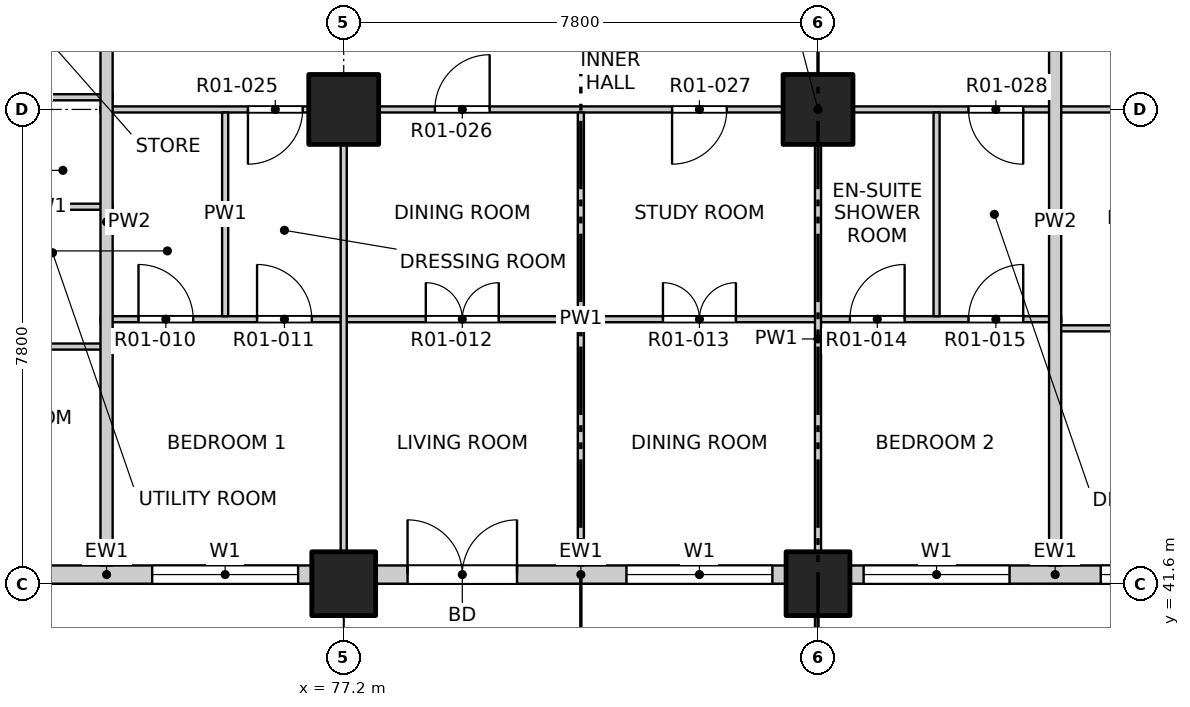
"""IFC4 building model, lengths in metres.
Left out: names, types, materials, properties, quantities, classifications, styles, units other than length and angle.
Written with IfcOpenShell. Run it as: python <this file> out.ifc"""

import sys

from ifc_helpers import new_model, si_unit, direction, frame, frame_2d, origin, origin_2d, place, context, subcontext, project, spatial, rectangle, extrude, element, fill, save


model = new_model("IFC4")
c1 = context("Model", 3, precision=1e-05, world=origin(), true_north=direction((0.0, 1.0)))
c2 = subcontext(c1, "Body", "Model", "MODEL_VIEW")
j1 = project(units=[si_unit("LENGTHUNIT", "METRE"), si_unit("PLANEANGLEUNIT", "RADIAN")], contexts=[c1])
p1 = place(None, origin())
s1 = spatial("IfcSite", under=j1, at=p1, CompositionType="ELEMENT")
p2 = place(p1, origin())
s2 = spatial("IfcBuilding", under=s1, at=p2, CompositionType="ELEMENT")
p3 = place(p2, frame((0.0, 0.0, 26.3)))
s3 = spatial("IfcBuildingStorey", under=s2, at=p3, CompositionType="ELEMENT", Elevation=26.3)
for number, where, z_axis, x_axis in (
    (1, (77.2, 41.6, -0.25), (0.0, 0.0, 1.0), (1.0, 0.0, 0.0)),
    (2, (85.0, 41.6, -0.25), (0.0, 0.0, 1.0), (1.0, 0.0, 0.0)),
):
    element("IfcColumn", number, at=place(p3, frame(where, z_axis=z_axis, x_axis=x_axis)), inside=s3, PredefinedType="COLUMN", context=c2, shape_type="SweptSolid", body=[
        extrude(rectangle(XDim=1.05, YDim=1.05, at=origin_2d()), origin(), (0.0, 0.0, 1.0), 3.4),
    ])
for number, where, z_axis, x_axis in (
    (3, (77.2, 49.4, -0.25), (0.0, 0.0, 1.0), (1.0, 0.0, 0.0)),
    (4, (85.0, 49.4, -0.25), (0.0, 0.0, 1.0), (1.0, 0.0, 0.0)),
):
    element("IfcColumn", number, at=place(p3, frame(where, z_axis=z_axis, x_axis=x_axis)), inside=s3, PredefinedType="COLUMN", context=c2, shape_type="SweptSolid", body=[
        extrude(rectangle(XDim=1.15, YDim=1.15, at=origin_2d()), origin(), (0.0, 0.0, 1.0), 3.4),
    ])
p4 = place(p3, frame((69.925, 41.75, 0.0), z_axis=(0.0, 0.0, 1.0), x_axis=(1.0, 0.0, 0.0)))
e5 = element("IfcWall", 5, at=p4, inside=s3, PredefinedType="SOLIDWALL", context=c2, shape_type="SweptSolid", body=[
    extrude(rectangle(XDim=6.75, YDim=0.3, at=frame_2d((3.375, 0.0))), origin(), (0.0, 0.0, 1.0), 2.7),
])
p5 = place(p4, frame((0.525, 0.0, 0.0)))
e6 = element("IfcOpeningElement", 6, at=p5, cuts=e5, PredefinedType="OPENING", context=c2, shape_type="SweptSolid", body=[
    extrude(rectangle(XDim=1.8, YDim=2.4, at=frame_2d((0.9, 1.2))), frame((0.0, 0.16, 0.0), z_axis=(0.0, -1.0, 0.0), x_axis=(1.0, 0.0, 0.0)), (0.0, 0.0, 1.0), 0.32),
])
p6 = place(p4, frame((4.125, 0.0, 0.9)))
e7 = element("IfcOpeningElement", 7, at=p6, cuts=e5, PredefinedType="OPENING", context=c2, shape_type="SweptSolid", body=[
    extrude(rectangle(XDim=2.4, YDim=1.8, at=frame_2d((1.2, 0.9))), frame((0.0, 0.16, 0.0), z_axis=(0.0, -1.0, 0.0), x_axis=(1.0, 0.0, 0.0)), (0.0, 0.0, 1.0), 0.32),
])
p7 = place(p3, frame((77.725, 41.75, 0.0), z_axis=(0.0, 0.0, 1.0), x_axis=(1.0, 0.0, 0.0)))
e8 = element("IfcWall", 8, at=p7, inside=s3, PredefinedType="SOLIDWALL", context=c2, shape_type="SweptSolid", body=[
    extrude(rectangle(XDim=6.75, YDim=0.3, at=frame_2d((3.375, 0.0))), origin(), (0.0, 0.0, 1.0), 2.7),
])
p8 = place(p7, frame((0.525, 0.0, 0.0)))
e9 = element("IfcOpeningElement", 9, at=p8, cuts=e8, PredefinedType="OPENING", context=c2, shape_type="SweptSolid", body=[
    extrude(rectangle(XDim=1.8, YDim=2.4, at=frame_2d((0.9, 1.2))), frame((0.0, 0.16, 0.0), z_axis=(0.0, -1.0, 0.0), x_axis=(1.0, 0.0, 0.0)), (0.0, 0.0, 1.0), 0.32),
])
p9 = place(p7, frame((4.125, 0.0, 0.9)))
e10 = element("IfcOpeningElement", 10, at=p9, cuts=e8, PredefinedType="OPENING", context=c2, shape_type="SweptSolid", body=[
    extrude(rectangle(XDim=2.4, YDim=1.8, at=frame_2d((1.2, 0.9))), frame((0.0, 0.16, 0.0), z_axis=(0.0, -1.0, 0.0), x_axis=(1.0, 0.0, 0.0)), (0.0, 0.0, 1.0), 0.32),
])
p10 = place(p3, frame((85.525, 41.75, 0.0), z_axis=(0.0, 0.0, 1.0), x_axis=(1.0, 0.0, 0.0)))
e11 = element("IfcWall", 11, at=p10, inside=s3, PredefinedType="SOLIDWALL", context=c2, shape_type="SweptSolid", body=[
    extrude(rectangle(XDim=6.75, YDim=0.3, at=frame_2d((3.375, 0.0))), origin(), (0.0, 0.0, 1.0), 2.7),
])
p11 = place(p10, frame((0.225, 0.0, 0.9)))
e12 = element("IfcOpeningElement", 12, at=p11, cuts=e11, PredefinedType="OPENING", context=c2, shape_type="SweptSolid", body=[
    extrude(rectangle(XDim=2.4, YDim=1.8, at=frame_2d((1.2, 0.9))), frame((0.0, 0.16, 0.0), z_axis=(0.0, -1.0, 0.0), x_axis=(1.0, 0.0, 0.0)), (0.0, 0.0, 1.0), 0.32),
])
p12 = place(p10, frame((4.125, 0.0, 0.9)))
e13 = element("IfcOpeningElement", 13, at=p12, cuts=e11, PredefinedType="OPENING", context=c2, shape_type="SweptSolid", body=[
    extrude(rectangle(XDim=2.4, YDim=1.8, at=frame_2d((1.2, 0.9))), frame((0.0, 0.16, 0.0), z_axis=(0.0, -1.0, 0.0), x_axis=(1.0, 0.0, 0.0)), (0.0, 0.0, 1.0), 0.32),
])
p13 = place(p3, frame((61.9, 45.5, 0.0), z_axis=(0.0, 0.0, 1.0), x_axis=(1.0, 0.0, 0.0)))
e14 = element("IfcWall", 14, at=p13, inside=s3, PredefinedType="PARTITIONING", context=c2, shape_type="SweptSolid", body=[
    extrude(rectangle(XDim=11.5, YDim=0.1, at=frame_2d((5.75, 0.0))), origin(), (0.0, 0.0, 1.0), 3.15),
])
p14 = place(p13, frame((7.965, 0.0, 0.0)))
e15 = element("IfcOpeningElement", 15, at=p14, cuts=e14, PredefinedType="OPENING", context=c2, shape_type="SweptSolid", body=[
    extrude(rectangle(XDim=0.9, YDim=2.1, at=frame_2d((0.45, 1.05))), frame((0.0, 0.06, 0.0), z_axis=(0.0, -1.0, 0.0), x_axis=(1.0, 0.0, 0.0)), (0.0, 0.0, 1.0), 0.12),
])
p15 = place(p3, frame((88.8, 45.8, 0.0), z_axis=(0.0, 0.0, 1.0), x_axis=(1.0, 0.0, 0.0)))
e16 = element("IfcWall", 16, at=p15, inside=s3, PredefinedType="PARTITIONING", context=c2, shape_type="SweptSolid", body=[
    extrude(rectangle(XDim=8.0, YDim=0.1, at=frame_2d((4.0, 0.0))), origin(), (0.0, 0.0, 1.0), 3.15),
])
p16 = place(p15, frame((1.45, 0.0, 0.0)))
e17 = element("IfcOpeningElement", 17, at=p16, cuts=e16, PredefinedType="OPENING", context=c2, shape_type="SweptSolid", body=[
    extrude(rectangle(XDim=1.2, YDim=2.1, at=frame_2d((0.6, 1.05))), frame((0.0, 0.06, 0.0), z_axis=(0.0, -1.0, 0.0), x_axis=(1.0, 0.0, 0.0)), (0.0, 0.0, 1.0), 0.12),
])
p17 = place(p15, frame((4.525, 0.0, 0.0)))
e18 = element("IfcOpeningElement", 18, at=p17, cuts=e16, PredefinedType="OPENING", context=c2, shape_type="SweptSolid", body=[
    extrude(rectangle(XDim=0.9, YDim=2.1, at=frame_2d((0.45, 1.05))), frame((0.0, 0.06, 0.0), z_axis=(0.0, -1.0, 0.0), x_axis=(1.0, 0.0, 0.0)), (0.0, 0.0, 1.0), 0.12),
])
p18 = place(p15, frame((6.475, 0.0, 0.0)))
e19 = element("IfcOpeningElement", 19, at=p18, cuts=e16, PredefinedType="OPENING", context=c2, shape_type="SweptSolid", body=[
    extrude(rectangle(XDim=0.9, YDim=2.1, at=frame_2d((0.45, 1.05))), frame((0.0, 0.06, 0.0), z_axis=(0.0, -1.0, 0.0), x_axis=(1.0, 0.0, 0.0)), (0.0, 0.0, 1.0), 0.12),
])
p19 = place(p3, frame((73.2, 45.95, 0.0), z_axis=(0.0, 0.0, 1.0), x_axis=(1.0, 0.0, 0.0)))
e20 = element("IfcWall", 20, at=p19, inside=s3, PredefinedType="PARTITIONING", context=c2, shape_type="SweptSolid", body=[
    extrude(rectangle(XDim=15.8, YDim=0.1, at=frame_2d((7.9, 0.0))), origin(), (0.0, 0.0, 1.0), 3.15),
])
p20 = place(p19, frame((0.625, 0.0, 0.0)))
e21 = element("IfcOpeningElement", 21, at=p20, cuts=e20, PredefinedType="OPENING", context=c2, shape_type="SweptSolid", body=[
    extrude(rectangle(XDim=0.9, YDim=2.1, at=frame_2d((0.45, 1.05))), frame((0.0, 0.06, 0.0), z_axis=(0.0, -1.0, 0.0), x_axis=(1.0, 0.0, 0.0)), (0.0, 0.0, 1.0), 0.12),
])
p21 = place(p19, frame((2.575, 0.0, 0.0)))
e22 = element("IfcOpeningElement", 22, at=p21, cuts=e20, PredefinedType="OPENING", context=c2, shape_type="SweptSolid", body=[
    extrude(rectangle(XDim=0.9, YDim=2.1, at=frame_2d((0.45, 1.05))), frame((0.0, 0.06, 0.0), z_axis=(0.0, -1.0, 0.0), x_axis=(1.0, 0.0, 0.0)), (0.0, 0.0, 1.0), 0.12),
])
p22 = place(p19, frame((5.35, 0.0, 0.0)))
e23 = element("IfcOpeningElement", 23, at=p22, cuts=e20, PredefinedType="OPENING", context=c2, shape_type="SweptSolid", body=[
    extrude(rectangle(XDim=1.2, YDim=2.1, at=frame_2d((0.6, 1.05))), frame((0.0, 0.06, 0.0), z_axis=(0.0, -1.0, 0.0), x_axis=(1.0, 0.0, 0.0)), (0.0, 0.0, 1.0), 0.12),
])
p23 = place(p19, frame((9.25, 0.0, 0.0)))
e24 = element("IfcOpeningElement", 24, at=p23, cuts=e20, PredefinedType="OPENING", context=c2, shape_type="SweptSolid", body=[
    extrude(rectangle(XDim=1.2, YDim=2.1, at=frame_2d((0.6, 1.05))), frame((0.0, 0.06, 0.0), z_axis=(0.0, -1.0, 0.0), x_axis=(1.0, 0.0, 0.0)), (0.0, 0.0, 1.0), 0.12),
])
p24 = place(p19, frame((12.325, 0.0, 0.0)))
e25 = element("IfcOpeningElement", 25, at=p24, cuts=e20, PredefinedType="OPENING", context=c2, shape_type="SweptSolid", body=[
    extrude(rectangle(XDim=0.9, YDim=2.1, at=frame_2d((0.45, 1.05))), frame((0.0, 0.06, 0.0), z_axis=(0.0, -1.0, 0.0), x_axis=(1.0, 0.0, 0.0)), (0.0, 0.0, 1.0), 0.12),
])
p25 = place(p19, frame((14.275, 0.0, 0.0)))
e26 = element("IfcOpeningElement", 26, at=p25, cuts=e20, PredefinedType="OPENING", context=c2, shape_type="SweptSolid", body=[
    extrude(rectangle(XDim=0.9, YDim=2.1, at=frame_2d((0.45, 1.05))), frame((0.0, 0.06, 0.0), z_axis=(0.0, -1.0, 0.0), x_axis=(1.0, 0.0, 0.0)), (0.0, 0.0, 1.0), 0.12),
])
p26 = place(p3, frame((71.18, 47.8, 0.0), z_axis=(0.0, 0.0, 1.0), x_axis=(1.0, 0.0, 0.0)))
e27 = element("IfcWall", 27, at=p26, inside=s3, PredefinedType="PARTITIONING", context=c2, shape_type="SweptSolid", body=[
    extrude(rectangle(XDim=2.22, YDim=0.1, at=frame_2d((1.11, 0.0))), origin(), (0.0, 0.0, 1.0), 3.15),
])
p27 = place(p3, frame((73.2, 49.4, 0.0), z_axis=(0.0, 0.0, 1.0), x_axis=(1.0, 0.0, 0.0)))
e28 = element("IfcWall", 28, at=p27, inside=s3, PredefinedType="PARTITIONING", context=c2, shape_type="SweptSolid", body=[
    extrude(rectangle(XDim=23.6, YDim=0.1, at=frame_2d((11.8, 0.0))), origin(), (0.0, 0.0, 1.0), 3.15),
])
p28 = place(p27, frame((2.425, 0.0, 0.0)))
e29 = element("IfcOpeningElement", 29, at=p28, cuts=e28, PredefinedType="OPENING", context=c2, shape_type="SweptSolid", body=[
    extrude(rectangle(XDim=0.9, YDim=2.1, at=frame_2d((0.45, 1.05))), frame((0.0, 0.06, 0.0), z_axis=(0.0, -1.0, 0.0), x_axis=(1.0, 0.0, 0.0)), (0.0, 0.0, 1.0), 0.12),
])
p29 = place(p27, frame((5.5, 0.0, 0.0)))
e30 = element("IfcOpeningElement", 30, at=p29, cuts=e28, PredefinedType="OPENING", context=c2, shape_type="SweptSolid", body=[
    extrude(rectangle(XDim=0.9, YDim=2.1, at=frame_2d((0.45, 1.05))), frame((0.0, 0.06, 0.0), z_axis=(0.0, -1.0, 0.0), x_axis=(1.0, 0.0, 0.0)), (0.0, 0.0, 1.0), 0.12),
])
p30 = place(p27, frame((9.4, 0.0, 0.0)))
e31 = element("IfcOpeningElement", 31, at=p30, cuts=e28, PredefinedType="OPENING", context=c2, shape_type="SweptSolid", body=[
    extrude(rectangle(XDim=0.9, YDim=2.1, at=frame_2d((0.45, 1.05))), frame((0.0, 0.06, 0.0), z_axis=(0.0, -1.0, 0.0), x_axis=(1.0, 0.0, 0.0)), (0.0, 0.0, 1.0), 0.12),
])
p31 = place(p27, frame((14.275, 0.0, 0.0)))
e32 = element("IfcOpeningElement", 32, at=p31, cuts=e28, PredefinedType="OPENING", context=c2, shape_type="SweptSolid", body=[
    extrude(rectangle(XDim=0.9, YDim=2.1, at=frame_2d((0.45, 1.05))), frame((0.0, 0.06, 0.0), z_axis=(0.0, -1.0, 0.0), x_axis=(1.0, 0.0, 0.0)), (0.0, 0.0, 1.0), 0.12),
])
p32 = place(p27, frame((17.2, 0.0, 0.0)))
e33 = element("IfcOpeningElement", 33, at=p32, cuts=e28, PredefinedType="OPENING", context=c2, shape_type="SweptSolid", body=[
    extrude(rectangle(XDim=0.9, YDim=2.1, at=frame_2d((0.45, 1.05))), frame((0.0, 0.06, 0.0), z_axis=(0.0, -1.0, 0.0), x_axis=(1.0, 0.0, 0.0)), (0.0, 0.0, 1.0), 0.12),
])
p33 = place(p27, frame((22.075, 0.0, 0.0)))
e34 = element("IfcOpeningElement", 34, at=p33, cuts=e28, PredefinedType="OPENING", context=c2, shape_type="SweptSolid", body=[
    extrude(rectangle(XDim=0.9, YDim=2.1, at=frame_2d((0.45, 1.05))), frame((0.0, 0.06, 0.0), z_axis=(0.0, -1.0, 0.0), x_axis=(1.0, 0.0, 0.0)), (0.0, 0.0, 1.0), 0.12),
])
p34 = place(p3, frame((71.18, 49.6, 0.0), z_axis=(0.0, 0.0, 1.0), x_axis=(1.0, 0.0, 0.0)))
e35 = element("IfcWall", 35, at=p34, inside=s3, PredefinedType="PARTITIONING", context=c2, shape_type="SweptSolid", body=[
    extrude(rectangle(XDim=2.22, YDim=0.1, at=frame_2d((1.11, 0.0))), origin(), (0.0, 0.0, 1.0), 3.15),
])
p35 = place(p3, frame((73.3, 41.9, 0.0), z_axis=(0.0, 0.0, 1.0), x_axis=(0.0, 1.0, 0.0)))
e36 = element("IfcWall", 36, at=p35, inside=s3, PredefinedType="PARTITIONING", context=c2, shape_type="SweptSolid", body=[
    extrude(rectangle(XDim=11.3, YDim=0.2, at=frame_2d((5.65, 0.0))), origin(), (0.0, 0.0, 1.0), 3.15),
])
p36 = place(p3, frame((75.25, 46.0, 0.0), z_axis=(0.0, 0.0, 1.0), x_axis=(0.0, 1.0, 0.0)))
e37 = element("IfcWall", 37, at=p36, inside=s3, PredefinedType="PARTITIONING", context=c2, shape_type="SweptSolid", body=[
    extrude(rectangle(XDim=3.35, YDim=0.1, at=frame_2d((1.675, 0.0))), origin(), (0.0, 0.0, 1.0), 3.15),
])
p37 = place(p3, frame((77.2, 41.9, 0.0), z_axis=(0.0, 0.0, 1.0), x_axis=(0.0, 1.0, 0.0)))
e38 = element("IfcWall", 38, at=p37, inside=s3, PredefinedType="PARTITIONING", context=c2, shape_type="SweptSolid", body=[
    extrude(rectangle(XDim=7.45, YDim=0.1, at=frame_2d((3.725, 0.0))), origin(), (0.0, 0.0, 1.0), 2.55),
])
p38 = place(p3, frame((81.1, 41.9, 0.0), z_axis=(0.0, 0.0, 1.0), x_axis=(0.0, 1.0, 0.0)))
e39 = element("IfcWall", 39, at=p38, inside=s3, PredefinedType="PARTITIONING", context=c2, shape_type="SweptSolid", body=[
    extrude(rectangle(XDim=7.45, YDim=0.1, at=frame_2d((3.725, 0.0))), origin(), (0.0, 0.0, 1.0), 3.15),
])
p39 = place(p3, frame((85.0, 41.9, 0.0), z_axis=(0.0, 0.0, 1.0), x_axis=(0.0, 1.0, 0.0)))
e40 = element("IfcWall", 40, at=p39, inside=s3, PredefinedType="PARTITIONING", context=c2, shape_type="SweptSolid", body=[
    extrude(rectangle(XDim=7.45, YDim=0.1, at=frame_2d((3.725, 0.0))), origin(), (0.0, 0.0, 1.0), 2.55),
])
p40 = place(p3, frame((86.95, 46.0, 0.0), z_axis=(0.0, 0.0, 1.0), x_axis=(0.0, 1.0, 0.0)))
e41 = element("IfcWall", 41, at=p40, inside=s3, PredefinedType="PARTITIONING", context=c2, shape_type="SweptSolid", body=[
    extrude(rectangle(XDim=3.35, YDim=0.1, at=frame_2d((1.675, 0.0))), origin(), (0.0, 0.0, 1.0), 3.15),
])
p41 = place(p3, frame((88.9, 41.9, 0.0), z_axis=(0.0, 0.0, 1.0), x_axis=(0.0, 1.0, 0.0)))
e42 = element("IfcWall", 42, at=p41, inside=s3, PredefinedType="PARTITIONING", context=c2, shape_type="SweptSolid", body=[
    extrude(rectangle(XDim=11.3, YDim=0.2, at=frame_2d((5.65, 0.0))), origin(), (0.0, 0.0, 1.0), 3.15),
])
p42 = place(p6, origin())
e43 = element("IfcWindow", 43, at=p42, inside=s3, PartitioningType="DOUBLE_PANEL_VERTICAL", PredefinedType="WINDOW", context=c2, shape_type="SweptSolid", body=[
    extrude(rectangle(XDim=2.4, YDim=1.8, at=frame_2d((1.2, 0.9))), frame((0.0, 0.03, 0.0), z_axis=(0.0, -1.0, 0.0), x_axis=(1.0, 0.0, 0.0)), (0.0, 0.0, 1.0), 0.06),
])
fill(e7, e43)
p43 = place(p8, origin())
e44 = element("IfcDoor", 44, at=p43, inside=s3, OperationType="DOUBLE_DOOR_SINGLE_SWING", PredefinedType="DOOR", context=c2, shape_type="SweptSolid", body=[
    extrude(rectangle(XDim=1.8, YDim=2.4, at=frame_2d((0.9, 1.2))), frame((0.0, 0.025, 0.0), z_axis=(0.0, -1.0, 0.0), x_axis=(1.0, 0.0, 0.0)), (0.0, 0.0, 1.0), 0.05),
])
fill(e9, e44)
p44 = place(p9, origin())
e45 = element("IfcWindow", 45, at=p44, inside=s3, PartitioningType="DOUBLE_PANEL_VERTICAL", PredefinedType="WINDOW", context=c2, shape_type="SweptSolid", body=[
    extrude(rectangle(XDim=2.4, YDim=1.8, at=frame_2d((1.2, 0.9))), frame((0.0, 0.03, 0.0), z_axis=(0.0, -1.0, 0.0), x_axis=(1.0, 0.0, 0.0)), (0.0, 0.0, 1.0), 0.06),
])
fill(e10, e45)
p45 = place(p11, origin())
e46 = element("IfcWindow", 46, at=p45, inside=s3, PartitioningType="DOUBLE_PANEL_VERTICAL", PredefinedType="WINDOW", context=c2, shape_type="SweptSolid", body=[
    extrude(rectangle(XDim=2.4, YDim=1.8, at=frame_2d((1.2, 0.9))), frame((0.0, 0.03, 0.0), z_axis=(0.0, -1.0, 0.0), x_axis=(1.0, 0.0, 0.0)), (0.0, 0.0, 1.0), 0.06),
])
fill(e12, e46)
p46 = place(p12, origin())
e47 = element("IfcWindow", 47, at=p46, inside=s3, PartitioningType="DOUBLE_PANEL_VERTICAL", PredefinedType="WINDOW", context=c2, shape_type="SweptSolid", body=[
    extrude(rectangle(XDim=2.4, YDim=1.8, at=frame_2d((1.2, 0.9))), frame((0.0, 0.03, 0.0), z_axis=(0.0, -1.0, 0.0), x_axis=(1.0, 0.0, 0.0)), (0.0, 0.0, 1.0), 0.06),
])
fill(e13, e47)
p47 = place(p20, origin())
e48 = element("IfcDoor", 48, at=p47, inside=s3, OperationType="SINGLE_SWING_LEFT", PredefinedType="DOOR", context=c2, shape_type="SweptSolid", body=[
    extrude(rectangle(XDim=0.9, YDim=2.1, at=frame_2d((0.45, 1.05))), frame((0.0, 0.025, 0.0), z_axis=(0.0, -1.0, 0.0), x_axis=(1.0, 0.0, 0.0)), (0.0, 0.0, 1.0), 0.05),
])
fill(e21, e48)
p48 = place(p21, origin())
e49 = element("IfcDoor", 49, at=p48, inside=s3, OperationType="SINGLE_SWING_LEFT", PredefinedType="DOOR", context=c2, shape_type="SweptSolid", body=[
    extrude(rectangle(XDim=0.9, YDim=2.1, at=frame_2d((0.45, 1.05))), frame((0.0, 0.025, 0.0), z_axis=(0.0, -1.0, 0.0), x_axis=(1.0, 0.0, 0.0)), (0.0, 0.0, 1.0), 0.05),
])
fill(e22, e49)
p49 = place(p22, origin())
e50 = element("IfcDoor", 50, at=p49, inside=s3, OperationType="DOUBLE_DOOR_SINGLE_SWING", PredefinedType="DOOR", context=c2, shape_type="SweptSolid", body=[
    extrude(rectangle(XDim=1.2, YDim=2.1, at=frame_2d((0.6, 1.05))), frame((0.0, 0.025, 0.0), z_axis=(0.0, -1.0, 0.0), x_axis=(1.0, 0.0, 0.0)), (0.0, 0.0, 1.0), 0.05),
])
fill(e23, e50)
p50 = place(p23, origin())
e51 = element("IfcDoor", 51, at=p50, inside=s3, OperationType="DOUBLE_DOOR_SINGLE_SWING", PredefinedType="DOOR", context=c2, shape_type="SweptSolid", body=[
    extrude(rectangle(XDim=1.2, YDim=2.1, at=frame_2d((0.6, 1.05))), frame((0.0, 0.025, 0.0), z_axis=(0.0, -1.0, 0.0), x_axis=(1.0, 0.0, 0.0)), (0.0, 0.0, 1.0), 0.05),
])
fill(e24, e51)
p51 = place(p24, origin())
e52 = element("IfcDoor", 52, at=p51, inside=s3, OperationType="SINGLE_SWING_RIGHT", PredefinedType="DOOR", context=c2, shape_type="SweptSolid", body=[
    extrude(rectangle(XDim=0.9, YDim=2.1, at=frame_2d((0.45, 1.05))), frame((0.0, 0.025, 0.0), z_axis=(0.0, -1.0, 0.0), x_axis=(1.0, 0.0, 0.0)), (0.0, 0.0, 1.0), 0.05),
])
fill(e25, e52)
p52 = place(p25, origin())
e53 = element("IfcDoor", 53, at=p52, inside=s3, OperationType="SINGLE_SWING_RIGHT", PredefinedType="DOOR", context=c2, shape_type="SweptSolid", body=[
    extrude(rectangle(XDim=0.9, YDim=2.1, at=frame_2d((0.45, 1.05))), frame((0.0, 0.025, 0.0), z_axis=(0.0, -1.0, 0.0), x_axis=(1.0, 0.0, 0.0)), (0.0, 0.0, 1.0), 0.05),
])
fill(e26, e53)
p53 = place(p28, origin())
e54 = element("IfcDoor", 54, at=p53, inside=s3, OperationType="SINGLE_SWING_RIGHT", PredefinedType="DOOR", context=c2, shape_type="SweptSolid", body=[
    extrude(rectangle(XDim=0.9, YDim=2.1, at=frame_2d((0.45, 1.05))), frame((0.0, 0.025, 0.0), z_axis=(0.0, -1.0, 0.0), x_axis=(1.0, 0.0, 0.0)), (0.0, 0.0, 1.0), 0.05),
])
fill(e29, e54)
p54 = place(p29, origin())
e55 = element("IfcDoor", 55, at=p54, inside=s3, OperationType="SINGLE_SWING_RIGHT", PredefinedType="DOOR", context=c2, shape_type="SweptSolid", body=[
    extrude(rectangle(XDim=0.9, YDim=2.1, at=frame_2d((0.45, 1.05))), frame((0.0, 0.025, 0.0), z_axis=(0.0, -1.0, 0.0), x_axis=(1.0, 0.0, 0.0)), (0.0, 0.0, 1.0), 0.05),
])
fill(e30, e55)
p55 = place(p30, origin())
e56 = element("IfcDoor", 56, at=p55, inside=s3, OperationType="SINGLE_SWING_RIGHT", PredefinedType="DOOR", context=c2, shape_type="SweptSolid", body=[
    extrude(rectangle(XDim=0.9, YDim=2.1, at=frame_2d((0.45, 1.05))), frame((0.0, 0.025, 0.0), z_axis=(0.0, -1.0, 0.0), x_axis=(1.0, 0.0, 0.0)), (0.0, 0.0, 1.0), 0.05),
])
fill(e31, e56)
p56 = place(p31, origin())
e57 = element("IfcDoor", 57, at=p56, inside=s3, OperationType="SINGLE_SWING_LEFT", PredefinedType="DOOR", context=c2, shape_type="SweptSolid", body=[
    extrude(rectangle(XDim=0.9, YDim=2.1, at=frame_2d((0.45, 1.05))), frame((0.0, 0.025, 0.0), z_axis=(0.0, -1.0, 0.0), x_axis=(1.0, 0.0, 0.0)), (0.0, 0.0, 1.0), 0.05),
])
fill(e32, e57)
save(model, sys.argv[1])
